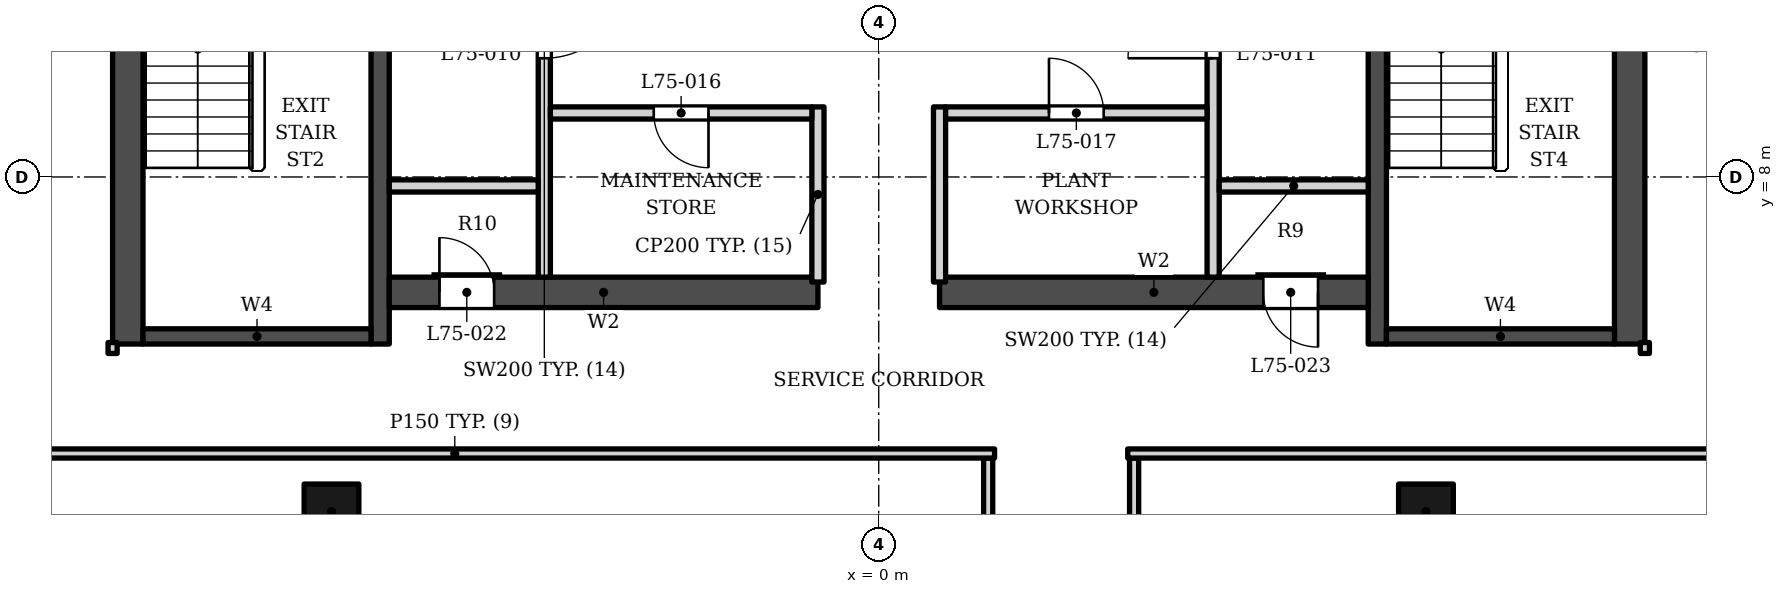
"""IFC4 building model, lengths in metres.
Left out: names, types, materials, properties, quantities, classifications, styles, units other than length and angle.
Written with IfcOpenShell. Run it as: python <this file> out.ifc"""

import sys

from ifc_helpers import new_model, si_unit, direction, frame, frame_2d, origin, origin_2d, place, context, subcontext, project, spatial, polyline, rectangle, outline, extrude, element, fill, save


model = new_model("IFC4")
c1 = context("Model", 3, precision=1e-05, world=origin(), true_north=direction((0.0, 1.0)))
c2 = subcontext(c1, "Body", "Model", "MODEL_VIEW")
j1 = project(units=[si_unit("LENGTHUNIT", "METRE"), si_unit("PLANEANGLEUNIT", "RADIAN")], contexts=[c1])
p1 = place(None, origin())
s1 = spatial("IfcSite", under=j1, at=p1, CompositionType="ELEMENT")
p2 = place(p1, origin())
s2 = spatial("IfcBuilding", under=s1, at=p2, CompositionType="ELEMENT")
p3 = place(p2, frame((0.0, 0.0, 320.5)))
s3 = spatial("IfcBuildingStorey", under=s2, at=p3, CompositionType="ELEMENT", Elevation=320.5)
p4 = place(p3, frame((-12.35, 5.253, 0.0), z_axis=(0.0, 0.0, 1.0), x_axis=(0.0, 1.0, 0.0)))
e1 = element("IfcWall", 1, at=p4, inside=s3, PredefinedType="SHEAR", context=c2, shape_type="SweptSolid", body=[
    extrude(rectangle(XDim=13.8, YDim=0.5, at=frame_2d((6.9, 0.0))), origin(), (0.0, 0.0, 1.0), 5.0),
])
p5 = place(p4, frame((7.2, 0.0, 0.0)))
e2 = element("IfcOpeningElement", 2, at=p5, cuts=e1, PredefinedType="OPENING", context=c2, shape_type="SweptSolid", body=[
    extrude(rectangle(XDim=1.2, YDim=2.1, at=frame_2d((0.6, 1.05))), frame((0.0, 0.26, 0.0), z_axis=(0.0, -1.0, 0.0), x_axis=(1.0, 0.0, 0.0)), (0.0, 0.0, 1.0), 0.52),
])
p6 = place(p4, frame((5.15, 0.0, 0.0)))
e3 = element("IfcOpeningElement", 3, at=p6, cuts=e1, PredefinedType="OPENING", context=c2, shape_type="SweptSolid", body=[
    extrude(rectangle(XDim=1.2, YDim=2.1, at=frame_2d((0.6, 1.05))), frame((0.0, 0.26, 0.0), z_axis=(0.0, -1.0, 0.0), x_axis=(1.0, 0.0, 0.0)), (0.0, 0.0, 1.0), 0.52),
])
p7 = place(p3, frame((-8.2, 5.253, 0.0), z_axis=(0.0, 0.0, 1.0), x_axis=(0.0, 1.0, 0.0)))
e4 = element("IfcWall", 4, at=p7, inside=s3, PredefinedType="SHEAR", context=c2, shape_type="SweptSolid", body=[
    extrude(rectangle(XDim=13.3, YDim=0.3, at=frame_2d((6.65, 0.0))), origin(), (0.0, 0.0, 1.0), 5.0),
])
p8 = place(p7, frame((7.1, 0.0, 0.0)))
e5 = element("IfcOpeningElement", 5, at=p8, cuts=e4, PredefinedType="OPENING", context=c2, shape_type="SweptSolid", body=[
    extrude(rectangle(XDim=1.4, YDim=2.1, at=frame_2d((0.7, 1.05))), frame((0.0, 0.16, 0.0), z_axis=(0.0, -1.0, 0.0), x_axis=(1.0, 0.0, 0.0)), (0.0, 0.0, 1.0), 0.32),
])
p9 = place(p7, frame((5.05, 0.0, 0.0)))
e6 = element("IfcOpeningElement", 6, at=p9, cuts=e4, PredefinedType="OPENING", context=c2, shape_type="SweptSolid", body=[
    extrude(rectangle(XDim=1.4, YDim=2.1, at=frame_2d((0.7, 1.05))), frame((0.0, 0.16, 0.0), z_axis=(0.0, -1.0, 0.0), x_axis=(1.0, 0.0, 0.0)), (0.0, 0.0, 1.0), 0.32),
])
p10 = place(p3, frame((-12.1, 5.378, 0.0), z_axis=(0.0, 0.0, 1.0), x_axis=(1.0, 0.0, 0.0)))
e7 = element("IfcWall", 7, at=p10, inside=s3, PredefinedType="SHEAR", context=c2, shape_type="SweptSolid", body=[
    extrude(rectangle(XDim=3.75, YDim=0.25, at=frame_2d((1.875, 0.0))), origin(), (0.0, 0.0, 1.0), 5.0),
])
p11 = place(p3, frame((12.35, 5.253, 0.0), z_axis=(0.0, 0.0, 1.0), x_axis=(0.0, 1.0, 0.0)))
e8 = element("IfcWall", 8, at=p11, inside=s3, PredefinedType="SHEAR", context=c2, shape_type="SweptSolid", body=[
    extrude(rectangle(XDim=13.8, YDim=0.5, at=frame_2d((6.9, 0.0))), origin(), (0.0, 0.0, 1.0), 5.0),
])
p12 = place(p11, frame((7.2, 0.0, 0.0)))
e9 = element("IfcOpeningElement", 9, at=p12, cuts=e8, PredefinedType="OPENING", context=c2, shape_type="SweptSolid", body=[
    extrude(rectangle(XDim=1.2, YDim=2.1, at=frame_2d((0.6, 1.05))), frame((0.0, 0.26, 0.0), z_axis=(0.0, -1.0, 0.0), x_axis=(1.0, 0.0, 0.0)), (0.0, 0.0, 1.0), 0.52),
])
p13 = place(p11, frame((5.15, 0.0, 0.0)))
e10 = element("IfcOpeningElement", 10, at=p13, cuts=e8, PredefinedType="OPENING", context=c2, shape_type="SweptSolid", body=[
    extrude(rectangle(XDim=1.2, YDim=2.1, at=frame_2d((0.6, 1.05))), frame((0.0, 0.26, 0.0), z_axis=(0.0, -1.0, 0.0), x_axis=(1.0, 0.0, 0.0)), (0.0, 0.0, 1.0), 0.52),
])
p14 = place(p3, frame((8.2, 5.253, 0.0), z_axis=(0.0, 0.0, 1.0), x_axis=(0.0, 1.0, 0.0)))
e11 = element("IfcWall", 11, at=p14, inside=s3, PredefinedType="SHEAR", context=c2, shape_type="SweptSolid", body=[
    extrude(rectangle(XDim=13.3, YDim=0.3, at=frame_2d((6.65, 0.0))), origin(), (0.0, 0.0, 1.0), 5.0),
])
p15 = place(p14, frame((7.1, 0.0, 0.0)))
e12 = element("IfcOpeningElement", 12, at=p15, cuts=e11, PredefinedType="OPENING", context=c2, shape_type="SweptSolid", body=[
    extrude(rectangle(XDim=1.4, YDim=2.1, at=frame_2d((0.7, 1.05))), frame((0.0, 0.16, 0.0), z_axis=(0.0, -1.0, 0.0), x_axis=(1.0, 0.0, 0.0)), (0.0, 0.0, 1.0), 0.32),
])
p16 = place(p14, frame((5.05, 0.0, 0.0)))
e13 = element("IfcOpeningElement", 13, at=p16, cuts=e11, PredefinedType="OPENING", context=c2, shape_type="SweptSolid", body=[
    extrude(rectangle(XDim=1.4, YDim=2.1, at=frame_2d((0.7, 1.05))), frame((0.0, 0.16, 0.0), z_axis=(0.0, -1.0, 0.0), x_axis=(1.0, 0.0, 0.0)), (0.0, 0.0, 1.0), 0.32),
])
p17 = place(p3, frame((8.35, 5.378, 0.0), z_axis=(0.0, 0.0, 1.0), x_axis=(1.0, 0.0, 0.0)))
e14 = element("IfcWall", 14, at=p17, inside=s3, PredefinedType="SHEAR", context=c2, shape_type="SweptSolid", body=[
    extrude(rectangle(XDim=3.75, YDim=0.25, at=frame_2d((1.875, 0.0))), origin(), (0.0, 0.0, 1.0), 5.0),
])
p18 = place(p3, frame((-8.05, 6.103, 0.0), z_axis=(0.0, 0.0, 1.0), x_axis=(1.0, 0.0, 0.0)))
e15 = element("IfcWall", 15, at=p18, inside=s3, PredefinedType="SHEAR", context=c2, shape_type="SweptSolid", body=[
    extrude(rectangle(XDim=7.05, YDim=0.5, at=frame_2d((3.525, 0.0))), origin(), (0.0, 0.0, 1.0), 5.0),
])
p19 = place(p18, frame((0.825, 0.0, 0.0)))
e16 = element("IfcOpeningElement", 16, at=p19, cuts=e15, PredefinedType="OPENING", context=c2, shape_type="SweptSolid", body=[
    extrude(rectangle(XDim=0.9, YDim=2.1, at=frame_2d((0.45, 1.05))), frame((0.0, 0.26, 0.0), z_axis=(0.0, -1.0, 0.0), x_axis=(1.0, 0.0, 0.0)), (0.0, 0.0, 1.0), 0.52),
])
p20 = place(p3, frame((1.0, 6.103, 0.0), z_axis=(0.0, 0.0, 1.0), x_axis=(1.0, 0.0, 0.0)))
e17 = element("IfcWall", 17, at=p20, inside=s3, PredefinedType="SHEAR", context=c2, shape_type="SweptSolid", body=[
    extrude(rectangle(XDim=7.05, YDim=0.5, at=frame_2d((3.525, 0.0))), origin(), (0.0, 0.0, 1.0), 5.0),
])
p21 = place(p20, frame((5.325, 0.0, 0.0)))
e18 = element("IfcOpeningElement", 18, at=p21, cuts=e17, PredefinedType="OPENING", context=c2, shape_type="SweptSolid", body=[
    extrude(rectangle(XDim=0.9, YDim=2.1, at=frame_2d((0.45, 1.05))), frame((0.0, 0.26, 0.0), z_axis=(0.0, -1.0, 0.0), x_axis=(1.0, 0.0, 0.0)), (0.0, 0.0, 1.0), 0.52),
])
for number, where, z_axis, x_axis in (
    (19, (-9.0, 2.5, 0.0), (0.0, 0.0, 1.0), (1.0, 0.0, 0.0)),
    (20, (9.0, 2.5, 0.0), (0.0, 0.0, 1.0), (1.0, 0.0, 0.0)),
):
    element("IfcColumn", number, at=place(p3, frame(where, z_axis=z_axis, x_axis=x_axis)), inside=s3, PredefinedType="COLUMN", context=c2, shape_type="SweptSolid", body=[
        extrude(rectangle(XDim=0.9, YDim=0.9, at=origin_2d()), origin(), (0.0, 0.0, 1.0), 5.0),
    ])
for number, where, z_axis, x_axis in (
    (21, (-1.0, 6.273, 0.0), (0.0, 0.0, 1.0), (0.0, 1.0, 0.0)),
    (22, (1.0, 6.273, 0.0), (0.0, 0.0, 1.0), (0.0, 1.0, 0.0)),
):
    element("IfcWall", number, at=place(p3, frame(where, z_axis=z_axis, x_axis=x_axis)), inside=s3, PredefinedType="PARTITIONING", context=c2, shape_type="SweptSolid", body=[
        extrude(rectangle(XDim=2.88, YDim=0.2, at=frame_2d((1.44, 0.0))), origin(), (0.0, 0.0, 1.0), 4.8),
    ])
p22 = place(p3, frame((-5.5, 6.353, 0.0), z_axis=(0.0, 0.0, 1.0), x_axis=(0.0, 1.0, 0.0)))
e23 = element("IfcWall", 23, at=p22, inside=s3, PredefinedType="SOLIDWALL", context=c2, shape_type="SweptSolid", body=[
    extrude(rectangle(XDim=7.85, YDim=0.2, at=frame_2d((3.925, 0.0))), origin(), (0.0, 0.0, 1.0), 4.8),
])
p23 = place(p22, frame((3.6, 0.0, 0.0)))
e24 = element("IfcOpeningElement", 24, at=p23, cuts=e23, PredefinedType="OPENING", context=c2, shape_type="SweptSolid", body=[
    extrude(rectangle(XDim=1.4, YDim=2.1, at=frame_2d((0.7, 1.05))), frame((0.0, 0.11, 0.0), z_axis=(0.0, -1.0, 0.0), x_axis=(1.0, 0.0, 0.0)), (0.0, 0.0, 1.0), 0.22),
])
p24 = place(p3, frame((5.5, 6.353, 0.0), z_axis=(0.0, 0.0, 1.0), x_axis=(0.0, 1.0, 0.0)))
e25 = element("IfcWall", 25, at=p24, inside=s3, PredefinedType="SOLIDWALL", context=c2, shape_type="SweptSolid", body=[
    extrude(rectangle(XDim=7.85, YDim=0.2, at=frame_2d((3.925, 0.0))), origin(), (0.0, 0.0, 1.0), 4.8),
])
p25 = place(p24, frame((3.6, 0.0, 0.0)))
e26 = element("IfcOpeningElement", 26, at=p25, cuts=e25, PredefinedType="OPENING", context=c2, shape_type="SweptSolid", body=[
    extrude(rectangle(XDim=1.4, YDim=2.1, at=frame_2d((0.7, 1.05))), frame((0.0, 0.11, 0.0), z_axis=(0.0, -1.0, 0.0), x_axis=(1.0, 0.0, 0.0)), (0.0, 0.0, 1.0), 0.22),
])
for number, where, z_axis, x_axis in (
    (27, (-8.05, 7.853, 0.0), (0.0, 0.0, 1.0), (1.0, 0.0, 0.0)),
    (28, (5.6, 7.853, 0.0), (0.0, 0.0, 1.0), (1.0, 0.0, 0.0)),
):
    element("IfcWall", number, at=place(p3, frame(where, z_axis=z_axis, x_axis=x_axis)), inside=s3, PredefinedType="SOLIDWALL", context=c2, shape_type="SweptSolid", body=[
        extrude(rectangle(XDim=2.45, YDim=0.2, at=frame_2d((1.225, 0.0))), origin(), (0.0, 0.0, 1.0), 4.8),
    ])
p26 = place(p3, frame((-5.4, 9.052, 0.0), z_axis=(0.0, 0.0, 1.0), x_axis=(1.0, 0.0, 0.0)))
e29 = element("IfcWall", 29, at=p26, inside=s3, PredefinedType="PARTITIONING", context=c2, shape_type="SweptSolid", body=[
    extrude(rectangle(XDim=4.3, YDim=0.2, at=frame_2d((2.15, 0.0))), origin(), (0.0, 0.0, 1.0), 4.8),
])
p27 = place(p26, frame((1.7, 0.0, 0.0)))
e30 = element("IfcOpeningElement", 30, at=p27, cuts=e29, PredefinedType="OPENING", context=c2, shape_type="SweptSolid", body=[
    extrude(rectangle(XDim=0.9, YDim=2.1, at=frame_2d((0.45, 1.05))), frame((0.0, 0.11, 0.0), z_axis=(0.0, -1.0, 0.0), x_axis=(1.0, 0.0, 0.0)), (0.0, 0.0, 1.0), 0.22),
])
p28 = place(p3, frame((1.1, 9.052, 0.0), z_axis=(0.0, 0.0, 1.0), x_axis=(1.0, 0.0, 0.0)))
e31 = element("IfcWall", 31, at=p28, inside=s3, PredefinedType="PARTITIONING", context=c2, shape_type="SweptSolid", body=[
    extrude(rectangle(XDim=4.3, YDim=0.2, at=frame_2d((2.15, 0.0))), origin(), (0.0, 0.0, 1.0), 4.8),
])
p29 = place(p28, frame((1.7, 0.0, 0.0)))
e32 = element("IfcOpeningElement", 32, at=p29, cuts=e31, PredefinedType="OPENING", context=c2, shape_type="SweptSolid", body=[
    extrude(rectangle(XDim=0.9, YDim=2.1, at=frame_2d((0.45, 1.05))), frame((0.0, 0.11, 0.0), z_axis=(0.0, -1.0, 0.0), x_axis=(1.0, 0.0, 0.0)), (0.0, 0.0, 1.0), 0.22),
])
p30 = place(p3, frame((1.8, -12.042, 0.0), z_axis=(0.0, 0.0, 1.0), x_axis=(0.0, 1.0, 0.0)))
e33 = element("IfcWall", 33, at=p30, inside=s3, PredefinedType="PARTITIONING", context=c2, shape_type="SweptSolid", body=[
    extrude(outline(polyline([(0.0, 0.0), (15.42, 0.0), (15.42, 4.8), (1.261, 4.8), (0.0, 3.742), (0.0, 0.0)])), frame((0.0, 0.075, 0.0), z_axis=(0.0, -1.0, 0.0), x_axis=(1.0, 0.0, 0.0)), (0.0, 0.0, 1.0), 0.15),
])
p31 = place(p30, frame((7.395, 0.0, 0.0)))
e34 = element("IfcOpeningElement", 34, at=p31, cuts=e33, PredefinedType="OPENING", context=c2, shape_type="SweptSolid", body=[
    extrude(rectangle(XDim=1.0, YDim=2.1, at=frame_2d((0.5, 1.05))), frame((0.0, 0.085, 0.0), z_axis=(0.0, -1.0, 0.0), x_axis=(1.0, 0.0, 0.0)), (0.0, 0.0, 1.0), 0.17),
])
p32 = place(p3, frame((4.2, -12.042, 0.0), z_axis=(0.0, 0.0, 1.0), x_axis=(0.0, 1.0, 0.0)))
e35 = element("IfcWall", 35, at=p32, inside=s3, PredefinedType="PARTITIONING", context=c2, shape_type="SweptSolid", body=[
    extrude(outline(polyline([(0.0, 0.0), (15.42, 0.0), (15.42, 4.8), (1.261, 4.8), (0.0, 3.742), (0.0, 0.0)])), frame((0.0, 0.075, 0.0), z_axis=(0.0, -1.0, 0.0), x_axis=(1.0, 0.0, 0.0)), (0.0, 0.0, 1.0), 0.15),
])
p33 = place(p32, frame((7.395, 0.0, 0.0)))
e36 = element("IfcOpeningElement", 36, at=p33, cuts=e35, PredefinedType="OPENING", context=c2, shape_type="SweptSolid", body=[
    extrude(rectangle(XDim=1.0, YDim=2.1, at=frame_2d((0.5, 1.05))), frame((0.0, 0.085, 0.0), z_axis=(0.0, -1.0, 0.0), x_axis=(1.0, 0.0, 0.0)), (0.0, 0.0, 1.0), 0.17),
])
p34 = place(p3, frame((-15.85, 3.453, 0.0), z_axis=(0.0, 0.0, 1.0), x_axis=(1.0, 0.0, 0.0)))
e37 = element("IfcWall", 37, at=p34, inside=s3, PredefinedType="PARTITIONING", context=c2, shape_type="SweptSolid", body=[
    extrude(rectangle(XDim=17.755, YDim=0.15, at=frame_2d((8.877, 0.0))), origin(), (0.0, 0.0, 1.0), 4.402),
])
p35 = place(p3, frame((4.095, 3.453, 0.0), z_axis=(0.0, 0.0, 1.0), x_axis=(1.0, 0.0, 0.0)))
e38 = element("IfcWall", 38, at=p35, inside=s3, PredefinedType="PARTITIONING", context=c2, shape_type="SweptSolid", body=[
    extrude(rectangle(XDim=13.627, YDim=0.15, at=frame_2d((6.813, 0.0))), origin(), (0.0, 0.0, 1.0), 4.352),
])
for number, where, z_axis, x_axis in (
    (39, (-12.6, 5.098, 0.0), (0.0, 0.0, 1.0), (0.0, 1.0, 0.0)),
    (40, (12.6, 5.098, 0.0), (0.0, 0.0, 1.0), (0.0, 1.0, 0.0)),
):
    element("IfcWall", number, at=place(p3, frame(where, z_axis=z_axis, x_axis=x_axis)), inside=s3, PredefinedType="PARTITIONING", context=c2, shape_type="SweptSolid", body=[
        extrude(rectangle(XDim=0.18, YDim=0.15, at=frame_2d((0.09, 0.0))), origin(), (0.0, 0.0, 1.0), 4.8),
    ])
p36 = place(p23, origin())
e41 = element("IfcDoor", 41, at=p36, inside=s3, OperationType="SINGLE_SWING_RIGHT", PredefinedType="DOOR", context=c2, shape_type="SweptSolid", body=[
    extrude(rectangle(XDim=1.4, YDim=2.1, at=frame_2d((0.7, 1.05))), frame((0.0, 0.025, 0.0), z_axis=(0.0, -1.0, 0.0), x_axis=(1.0, 0.0, 0.0)), (0.0, 0.0, 1.0), 0.05),
])
fill(e24, e41)
p37 = place(p25, origin())
e42 = element("IfcDoor", 42, at=p37, inside=s3, OperationType="SINGLE_SWING_LEFT", PredefinedType="DOOR", context=c2, shape_type="SweptSolid", body=[
    extrude(rectangle(XDim=1.4, YDim=2.1, at=frame_2d((0.7, 1.05))), frame((0.0, 0.025, 0.0), z_axis=(0.0, -1.0, 0.0), x_axis=(1.0, 0.0, 0.0)), (0.0, 0.0, 1.0), 0.05),
])
fill(e26, e42)
p38 = place(p27, origin())
e43 = element("IfcDoor", 43, at=p38, inside=s3, OperationType="SINGLE_SWING_RIGHT", PredefinedType="DOOR", context=c2, shape_type="SweptSolid", body=[
    extrude(rectangle(XDim=0.9, YDim=2.1, at=frame_2d((0.45, 1.05))), frame((0.0, 0.025, 0.0), z_axis=(0.0, -1.0, 0.0), x_axis=(1.0, 0.0, 0.0)), (0.0, 0.0, 1.0), 0.05),
])
fill(e30, e43)
p39 = place(p29, origin())
e44 = element("IfcDoor", 44, at=p39, inside=s3, OperationType="SINGLE_SWING_LEFT", PredefinedType="DOOR", context=c2, shape_type="SweptSolid", body=[
    extrude(rectangle(XDim=0.9, YDim=2.1, at=frame_2d((0.45, 1.05))), frame((0.0, 0.025, 0.0), z_axis=(0.0, -1.0, 0.0), x_axis=(1.0, 0.0, 0.0)), (0.0, 0.0, 1.0), 0.05),
])
fill(e32, e44)
p40 = place(p19, origin())
e45 = element("IfcDoor", 45, at=p40, inside=s3, OperationType="SINGLE_SWING_LEFT", PredefinedType="DOOR", context=c2, shape_type="SweptSolid", body=[
    extrude(rectangle(XDim=0.9, YDim=2.1, at=frame_2d((0.45, 1.05))), frame((0.0, 0.025, 0.0), z_axis=(0.0, -1.0, 0.0), x_axis=(1.0, 0.0, 0.0)), (0.0, 0.0, 1.0), 0.05),
])
fill(e16, e45)
p41 = place(p21, origin())
e46 = element("IfcDoor", 46, at=p41, inside=s3, OperationType="SINGLE_SWING_RIGHT", PredefinedType="DOOR", context=c2, shape_type="SweptSolid", body=[
    extrude(rectangle(XDim=0.9, YDim=2.1, at=frame_2d((0.45, 1.05))), frame((0.0, 0.025, 0.0), z_axis=(0.0, -1.0, 0.0), x_axis=(1.0, 0.0, 0.0)), (0.0, 0.0, 1.0), 0.05),
])
fill(e18, e46)
save(model, sys.argv[1])
